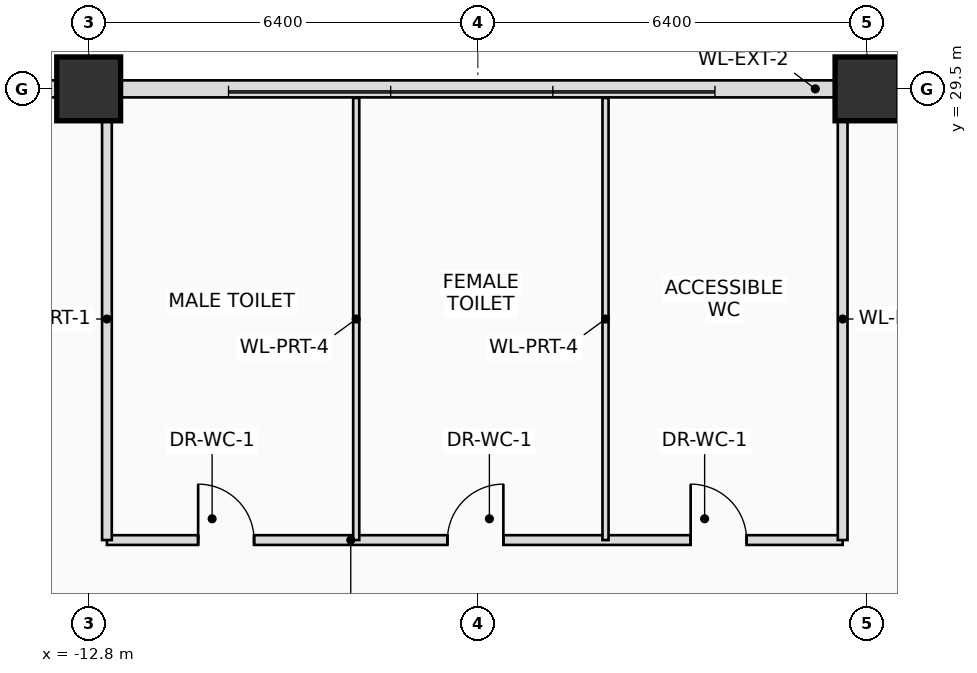
"""IFC4 building model, lengths in metres.
Left out: names, types, materials, properties, quantities, classifications, styles, units other than length and angle.
Written with IfcOpenShell. Run it as: python <this file> out.ifc"""

import sys

from ifc_helpers import new_model, si_unit, direction, frame, frame_2d, origin, origin_2d, place, context, subcontext, project, spatial, rectangle, extrude, source, transform, mapped, element, fill, save


model = new_model("IFC4")
c1 = context("Model", 3, precision=1e-05, world=origin(), true_north=direction((0.0, 1.0)))
c2 = subcontext(c1, "Body", "Model", "MODEL_VIEW")
j1 = project(units=[si_unit("LENGTHUNIT", "METRE"), si_unit("PLANEANGLEUNIT", "RADIAN")], contexts=[c1])
p1 = place(None, origin())
s1 = spatial("IfcSite", under=j1, at=p1, CompositionType="ELEMENT")
p2 = place(p1, origin())
s2 = spatial("IfcBuilding", under=s1, at=p2, CompositionType="ELEMENT")
p3 = place(p2, frame((0.0, 0.0, 8.4)))
s3 = spatial("IfcBuildingStorey", under=s2, at=p3, CompositionType="ELEMENT", Elevation=8.4)
m1 = source(origin(), c2, "Body", "SweptSolid", [
    extrude(rectangle(XDim=1.05, YDim=1.05, at=origin_2d()), origin(), (0.0, 0.0, 1.0), 3.9),
])
for number, where, z_axis, x_axis in (
    (1, (-12.8, 29.5, 0.0), (0.0, 0.0, 1.0), (1.0, 0.0, 0.0)),
    (2, (0.0, 29.5, 0.0), (0.0, 0.0, 1.0), (1.0, 0.0, 0.0)),
):
    element("IfcColumn", number, at=place(p3, frame(where, z_axis=z_axis, x_axis=x_axis)), inside=s3, PredefinedType="COLUMN", context=c2, shape_type="MappedRepresentation", body=[
        mapped(m1, transform((0.0, 0.0, 0.0), scale=1.0)),
    ])
p4 = place(p3, frame((-34.0, 29.5, 0.0), z_axis=(0.0, 0.0, 1.0), x_axis=(1.0, 0.0, 0.0)))
e3 = element("IfcWall", 3, at=p4, inside=s3, PredefinedType="SOLIDWALL", context=c2, shape_type="SweptSolid", body=[
    extrude(rectangle(XDim=68.0, YDim=0.28, at=frame_2d((34.0, 0.0))), origin(), (0.0, 0.0, 1.0), 2.65),
])
p5 = place(p4, frame((15.8, 0.0, 0.65)))
e4 = element("IfcOpeningElement", 4, at=p5, cuts=e3, PredefinedType="OPENING", context=c2, shape_type="SweptSolid", body=[
    extrude(rectangle(XDim=1.5, YDim=1.8, at=frame_2d((0.75, 0.9))), frame((0.0, 0.15, 0.0), z_axis=(0.0, -1.0, 0.0), x_axis=(1.0, 0.0, 0.0)), (0.0, 0.0, 1.0), 0.3),
])
p6 = place(p4, frame((49.0, 0.0, 0.65)))
e5 = element("IfcOpeningElement", 5, at=p6, cuts=e3, PredefinedType="OPENING", context=c2, shape_type="SweptSolid", body=[
    extrude(rectangle(XDim=1.5, YDim=1.8, at=frame_2d((0.75, 0.9))), frame((0.0, 0.15, 0.0), z_axis=(0.0, -1.0, 0.0), x_axis=(1.0, 0.0, 0.0)), (0.0, 0.0, 1.0), 0.3),
])
p7 = place(p3, frame((-12.5, 22.08, 0.0), z_axis=(0.0, 0.0, 1.0), x_axis=(1.0, 0.0, 0.0)))
e6 = element("IfcWall", 6, at=p7, inside=s3, PredefinedType="PARTITIONING", context=c2, shape_type="SweptSolid", body=[
    extrude(rectangle(XDim=12.1, YDim=0.16, at=frame_2d((6.05, 0.0))), origin(), (0.0, 0.0, 1.0), 3.57),
])
p8 = place(p7, frame((1.5, 0.0, 0.0)))
e7 = element("IfcOpeningElement", 7, at=p8, cuts=e6, PredefinedType="OPENING", context=c2, shape_type="SweptSolid", body=[
    extrude(rectangle(XDim=0.92, YDim=2.1, at=frame_2d((0.46, 1.05))), frame((0.0, 0.09, 0.0), z_axis=(0.0, -1.0, 0.0), x_axis=(1.0, 0.0, 0.0)), (0.0, 0.0, 1.0), 0.18),
])
p9 = place(p7, frame((5.6, 0.0, 0.0)))
e8 = element("IfcOpeningElement", 8, at=p9, cuts=e6, PredefinedType="OPENING", context=c2, shape_type="SweptSolid", body=[
    extrude(rectangle(XDim=0.92, YDim=2.1, at=frame_2d((0.46, 1.05))), frame((0.0, 0.09, 0.0), z_axis=(0.0, -1.0, 0.0), x_axis=(1.0, 0.0, 0.0)), (0.0, 0.0, 1.0), 0.18),
])
p10 = place(p7, frame((9.6, 0.0, 0.0)))
e9 = element("IfcOpeningElement", 9, at=p10, cuts=e6, PredefinedType="OPENING", context=c2, shape_type="SweptSolid", body=[
    extrude(rectangle(XDim=0.92, YDim=2.1, at=frame_2d((0.46, 1.05))), frame((0.0, 0.09, 0.0), z_axis=(0.0, -1.0, 0.0), x_axis=(1.0, 0.0, 0.0)), (0.0, 0.0, 1.0), 0.18),
])
p11 = place(p3, frame((-12.5, 22.08, 0.0), z_axis=(0.0, 0.0, 1.0), x_axis=(0.0, 1.0, 0.0)))
e10 = element("IfcWall", 10, at=p11, inside=s3, PredefinedType="PARTITIONING", context=c2, shape_type="SweptSolid", body=[
    extrude(rectangle(XDim=7.27, YDim=0.16, at=frame_2d((3.635, 0.0))), origin(), (0.0, 0.0, 1.0), 3.57),
])
for number, where, z_axis, x_axis in (
    (11, (-8.4, 22.08, 0.0), (0.0, 0.0, 1.0), (0.0, 1.0, 0.0)),
    (12, (-4.3, 22.08, 0.0), (0.0, 0.0, 1.0), (0.0, 1.0, 0.0)),
):
    element("IfcWall", number, at=place(p3, frame(where, z_axis=z_axis, x_axis=x_axis)), inside=s3, PredefinedType="PARTITIONING", context=c2, shape_type="SweptSolid", body=[
        extrude(rectangle(XDim=7.27, YDim=0.1, at=frame_2d((3.635, 0.0))), origin(), (0.0, 0.0, 1.0), 3.57),
    ])
p12 = place(p3, frame((-0.4, 22.08, 0.0), z_axis=(0.0, 0.0, 1.0), x_axis=(0.0, 1.0, 0.0)))
e13 = element("IfcWall", 13, at=p12, inside=s3, PredefinedType="PARTITIONING", context=c2, shape_type="SweptSolid", body=[
    extrude(rectangle(XDim=7.27, YDim=0.16, at=frame_2d((3.635, 0.0))), origin(), (0.0, 0.0, 1.0), 3.57),
])
p13 = place(p8, origin())
e14 = element("IfcDoor", 14, at=p13, inside=s3, OperationType="SINGLE_SWING_LEFT", PredefinedType="DOOR", context=c2, shape_type="SweptSolid", body=[
    extrude(rectangle(XDim=0.92, YDim=2.1, at=frame_2d((0.46, 1.05))), frame((0.0, 0.025, 0.0), z_axis=(0.0, -1.0, 0.0), x_axis=(1.0, 0.0, 0.0)), (0.0, 0.0, 1.0), 0.05),
])
fill(e7, e14)
p14 = place(p9, origin())
e15 = element("IfcDoor", 15, at=p14, inside=s3, OperationType="SINGLE_SWING_RIGHT", PredefinedType="DOOR", context=c2, shape_type="SweptSolid", body=[
    extrude(rectangle(XDim=0.92, YDim=2.1, at=frame_2d((0.46, 1.05))), frame((0.0, 0.025, 0.0), z_axis=(0.0, -1.0, 0.0), x_axis=(1.0, 0.0, 0.0)), (0.0, 0.0, 1.0), 0.05),
])
fill(e8, e15)
p15 = place(p10, origin())
e16 = element("IfcDoor", 16, at=p15, inside=s3, OperationType="SINGLE_SWING_LEFT", PredefinedType="DOOR", context=c2, shape_type="SweptSolid", body=[
    extrude(rectangle(XDim=0.92, YDim=2.1, at=frame_2d((0.46, 1.05))), frame((0.0, 0.025, 0.0), z_axis=(0.0, -1.0, 0.0), x_axis=(1.0, 0.0, 0.0)), (0.0, 0.0, 1.0), 0.05),
])
fill(e9, e16)
save(model, sys.argv[1])
